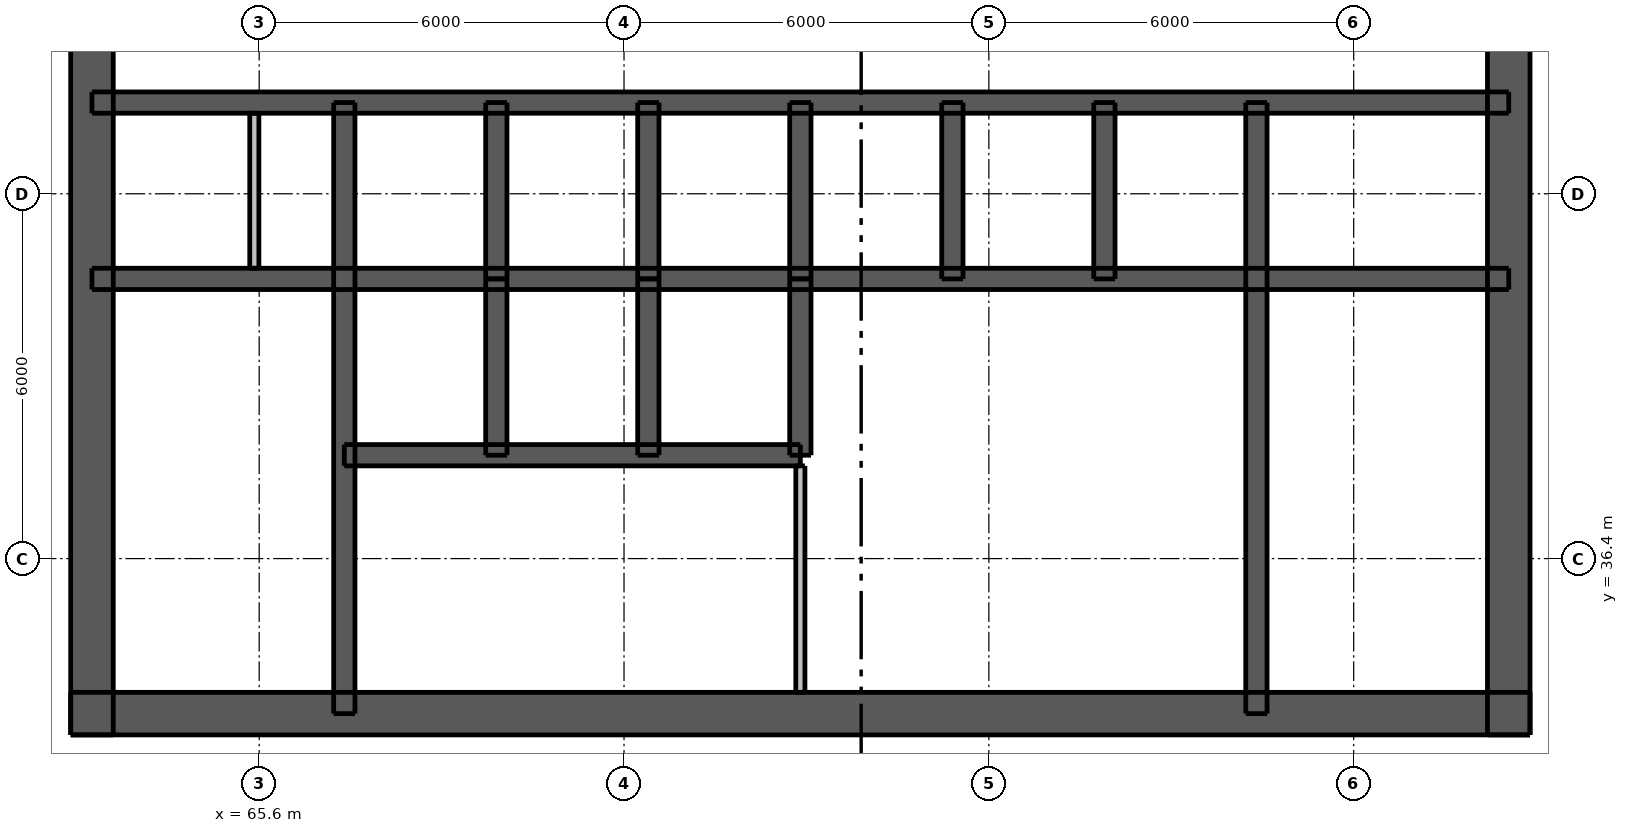
"""IFC4 building model, lengths in metres.
Left out: names, types, materials, properties, quantities, classifications, styles, units other than length and angle.
Written with IfcOpenShell. Run it as: python <this file> out.ifc"""

import sys

from ifc_helpers import new_model, si_unit, direction, frame, frame_2d, origin, place, context, subcontext, project, spatial, rectangle, extrude, element, fill, save


model = new_model("IFC4")
c1 = context("Model", 3, precision=1e-05, world=origin(), true_north=direction((0.0, 1.0)))
c2 = subcontext(c1, "Body", "Model", "MODEL_VIEW")
j1 = project(units=[si_unit("LENGTHUNIT", "METRE"), si_unit("PLANEANGLEUNIT", "RADIAN")], contexts=[c1])
p1 = place(None, origin())
s1 = spatial("IfcSite", under=j1, at=p1, CompositionType="ELEMENT")
p2 = place(p1, origin())
s2 = spatial("IfcBuilding", under=s1, at=p2, CompositionType="ELEMENT")
p3 = place(p2, frame((0.0, 0.0, 140.5)))
s3 = spatial("IfcBuildingStorey", under=s2, at=p3, CompositionType="ELEMENT", Elevation=140.5)
p4 = place(p3, frame((62.5, 33.85, 0.0), z_axis=(0.0, 0.0, 1.0), x_axis=(1.0, 0.0, 0.0)))
e1 = element("IfcWall", 1, at=p4, inside=s3, PredefinedType="SHEAR", context=c2, shape_type="SweptSolid", body=[
    extrude(rectangle(XDim=24.0, YDim=0.7, at=frame_2d((12.0, 0.0))), origin(), (0.0, 0.0, 1.0), 3.05),
])
p5 = place(p4, frame((1.962, 0.0, 0.0)))
e2 = element("IfcOpeningElement", 2, at=p5, cuts=e1, PredefinedType="OPENING", context=c2, shape_type="SweptSolid", body=[
    extrude(rectangle(XDim=1.1, YDim=2.1, at=frame_2d((0.55, 1.05))), frame((0.0, 0.36, 0.0), z_axis=(0.0, -1.0, 0.0), x_axis=(1.0, 0.0, 0.0)), (0.0, 0.0, 1.0), 0.72),
])
p6 = place(p4, frame((20.938, 0.0, 0.0)))
e3 = element("IfcOpeningElement", 3, at=p6, cuts=e1, PredefinedType="OPENING", context=c2, shape_type="SweptSolid", body=[
    extrude(rectangle(XDim=1.1, YDim=2.1, at=frame_2d((0.55, 1.05))), frame((0.0, 0.36, 0.0), z_axis=(0.0, -1.0, 0.0), x_axis=(1.0, 0.0, 0.0)), (0.0, 0.0, 1.0), 0.72),
])
p7 = place(p4, frame((8.0, 0.0, 0.0)))
e4 = element("IfcOpeningElement", 4, at=p7, cuts=e1, PredefinedType="OPENING", context=c2, shape_type="SweptSolid", body=[
    extrude(rectangle(XDim=1.1, YDim=2.1, at=frame_2d((0.55, 1.05))), frame((0.0, 0.36, 0.0), z_axis=(0.0, -1.0, 0.0), x_axis=(1.0, 0.0, 0.0)), (0.0, 0.0, 1.0), 0.72),
])
p8 = place(p4, frame((15.3, 0.0, 0.0)))
e5 = element("IfcOpeningElement", 5, at=p8, cuts=e1, PredefinedType="OPENING", context=c2, shape_type="SweptSolid", body=[
    extrude(rectangle(XDim=0.9, YDim=2.1, at=frame_2d((0.45, 1.05))), frame((0.0, 0.36, 0.0), z_axis=(0.0, -1.0, 0.0), x_axis=(1.0, 0.0, 0.0)), (0.0, 0.0, 1.0), 0.72),
])
p9 = place(p3, frame((62.85, 33.5, 0.0), z_axis=(0.0, 0.0, 1.0), x_axis=(0.0, 1.0, 0.0)))
e6 = element("IfcWall", 6, at=p9, inside=s3, PredefinedType="SHEAR", context=c2, shape_type="SweptSolid", body=[
    extrude(rectangle(XDim=24.0, YDim=0.7, at=frame_2d((12.0, 0.0))), origin(), (0.0, 0.0, 1.0), 3.05),
])
p10 = place(p9, frame((11.2, 0.0, 0.0)))
e7 = element("IfcOpeningElement", 7, at=p10, cuts=e6, PredefinedType="OPENING", context=c2, shape_type="SweptSolid", body=[
    extrude(rectangle(XDim=1.6, YDim=2.1, at=frame_2d((0.8, 1.05))), frame((0.0, 0.36, 0.0), z_axis=(0.0, -1.0, 0.0), x_axis=(1.0, 0.0, 0.0)), (0.0, 0.0, 1.0), 0.72),
])
p11 = place(p3, frame((86.15, 33.5, 0.0), z_axis=(0.0, 0.0, 1.0), x_axis=(0.0, 1.0, 0.0)))
e8 = element("IfcWall", 8, at=p11, inside=s3, PredefinedType="SHEAR", context=c2, shape_type="SweptSolid", body=[
    extrude(rectangle(XDim=24.0, YDim=0.7, at=frame_2d((12.0, 0.0))), origin(), (0.0, 0.0, 1.0), 3.05),
])
p12 = place(p11, frame((11.2, 0.0, 0.0)))
e9 = element("IfcOpeningElement", 9, at=p12, cuts=e8, PredefinedType="OPENING", context=c2, shape_type="SweptSolid", body=[
    extrude(rectangle(XDim=1.6, YDim=2.1, at=frame_2d((0.8, 1.05))), frame((0.0, 0.36, 0.0), z_axis=(0.0, -1.0, 0.0), x_axis=(1.0, 0.0, 0.0)), (0.0, 0.0, 1.0), 0.72),
])
p13 = place(p3, frame((62.85, 41.0, 0.0), z_axis=(0.0, 0.0, 1.0), x_axis=(1.0, 0.0, 0.0)))
e10 = element("IfcWall", 10, at=p13, inside=s3, PredefinedType="SHEAR", context=c2, shape_type="SweptSolid", body=[
    extrude(rectangle(XDim=23.3, YDim=0.35, at=frame_2d((11.65, 0.0))), origin(), (0.0, 0.0, 1.0), 3.05),
])
p14 = place(p3, frame((62.85, 43.9, 0.0), z_axis=(0.0, 0.0, 1.0), x_axis=(1.0, 0.0, 0.0)))
e11 = element("IfcWall", 11, at=p14, inside=s3, PredefinedType="SHEAR", context=c2, shape_type="SweptSolid", body=[
    extrude(rectangle(XDim=23.3, YDim=0.35, at=frame_2d((11.65, 0.0))), origin(), (0.0, 0.0, 1.0), 3.05),
])
p15 = place(p14, frame((1.06, 0.0, 0.0)))
e12 = element("IfcOpeningElement", 12, at=p15, cuts=e11, PredefinedType="OPENING", context=c2, shape_type="SweptSolid", body=[
    extrude(rectangle(XDim=0.9, YDim=2.1, at=frame_2d((0.45, 1.05))), frame((0.0, 0.185, 0.0), z_axis=(0.0, -1.0, 0.0), x_axis=(1.0, 0.0, 0.0)), (0.0, 0.0, 1.0), 0.37),
])
p16 = place(p14, frame((2.923, 0.0, 0.0)))
e13 = element("IfcOpeningElement", 13, at=p16, cuts=e11, PredefinedType="OPENING", context=c2, shape_type="SweptSolid", body=[
    extrude(rectangle(XDim=0.8, YDim=2.1, at=frame_2d((0.4, 1.05))), frame((0.0, 0.185, 0.0), z_axis=(0.0, -1.0, 0.0), x_axis=(1.0, 0.0, 0.0)), (0.0, 0.0, 1.0), 0.37),
])
p17 = place(p14, frame((20.688, 0.0, 0.0)))
e14 = element("IfcOpeningElement", 14, at=p17, cuts=e11, PredefinedType="OPENING", context=c2, shape_type="SweptSolid", body=[
    extrude(rectangle(XDim=0.9, YDim=2.1, at=frame_2d((0.45, 1.05))), frame((0.0, 0.185, 0.0), z_axis=(0.0, -1.0, 0.0), x_axis=(1.0, 0.0, 0.0)), (0.0, 0.0, 1.0), 0.37),
])
p18 = place(p14, frame((4.85, 0.0, 0.0)))
e15 = element("IfcOpeningElement", 15, at=p18, cuts=e11, PredefinedType="OPENING", context=c2, shape_type="SweptSolid", body=[
    extrude(rectangle(XDim=1.1, YDim=2.1, at=frame_2d((0.55, 1.05))), frame((0.0, 0.185, 0.0), z_axis=(0.0, -1.0, 0.0), x_axis=(1.0, 0.0, 0.0)), (0.0, 0.0, 1.0), 0.37),
])
p19 = place(p14, frame((7.35, 0.0, 0.0)))
e16 = element("IfcOpeningElement", 16, at=p19, cuts=e11, PredefinedType="OPENING", context=c2, shape_type="SweptSolid", body=[
    extrude(rectangle(XDim=1.1, YDim=2.1, at=frame_2d((0.55, 1.05))), frame((0.0, 0.185, 0.0), z_axis=(0.0, -1.0, 0.0), x_axis=(1.0, 0.0, 0.0)), (0.0, 0.0, 1.0), 0.37),
])
p20 = place(p14, frame((9.85, 0.0, 0.0)))
e17 = element("IfcOpeningElement", 17, at=p20, cuts=e11, PredefinedType="OPENING", context=c2, shape_type="SweptSolid", body=[
    extrude(rectangle(XDim=1.1, YDim=2.1, at=frame_2d((0.55, 1.05))), frame((0.0, 0.185, 0.0), z_axis=(0.0, -1.0, 0.0), x_axis=(1.0, 0.0, 0.0)), (0.0, 0.0, 1.0), 0.37),
])
p21 = place(p14, frame((12.35, 0.0, 0.0)))
e18 = element("IfcOpeningElement", 18, at=p21, cuts=e11, PredefinedType="OPENING", context=c2, shape_type="SweptSolid", body=[
    extrude(rectangle(XDim=1.1, YDim=2.1, at=frame_2d((0.55, 1.05))), frame((0.0, 0.185, 0.0), z_axis=(0.0, -1.0, 0.0), x_axis=(1.0, 0.0, 0.0)), (0.0, 0.0, 1.0), 0.37),
])
p22 = place(p14, frame((14.85, 0.0, 0.0)))
e19 = element("IfcOpeningElement", 19, at=p22, cuts=e11, PredefinedType="OPENING", context=c2, shape_type="SweptSolid", body=[
    extrude(rectangle(XDim=1.1, YDim=2.1, at=frame_2d((0.55, 1.05))), frame((0.0, 0.185, 0.0), z_axis=(0.0, -1.0, 0.0), x_axis=(1.0, 0.0, 0.0)), (0.0, 0.0, 1.0), 0.37),
])
p23 = place(p14, frame((17.35, 0.0, 0.0)))
e20 = element("IfcOpeningElement", 20, at=p23, cuts=e11, PredefinedType="OPENING", context=c2, shape_type="SweptSolid", body=[
    extrude(rectangle(XDim=1.1, YDim=2.1, at=frame_2d((0.55, 1.05))), frame((0.0, 0.185, 0.0), z_axis=(0.0, -1.0, 0.0), x_axis=(1.0, 0.0, 0.0)), (0.0, 0.0, 1.0), 0.37),
])
p24 = place(p3, frame((67.0, 33.85, 0.0), z_axis=(0.0, 0.0, 1.0), x_axis=(0.0, 1.0, 0.0)))
e21 = element("IfcWall", 21, at=p24, inside=s3, PredefinedType="SHEAR", context=c2, shape_type="SweptSolid", body=[
    extrude(rectangle(XDim=10.05, YDim=0.35, at=frame_2d((5.025, 0.0))), origin(), (0.0, 0.0, 1.0), 3.05),
])
p25 = place(p24, frame((0.55, 0.0, 0.0)))
e22 = element("IfcOpeningElement", 22, at=p25, cuts=e21, PredefinedType="OPENING", context=c2, shape_type="SweptSolid", body=[
    extrude(rectangle(XDim=1.1, YDim=2.1, at=frame_2d((0.55, 1.05))), frame((0.0, 0.185, 0.0), z_axis=(0.0, -1.0, 0.0), x_axis=(1.0, 0.0, 0.0)), (0.0, 0.0, 1.0), 0.37),
])
p26 = place(p3, frame((82.0, 33.85, 0.0), z_axis=(0.0, 0.0, 1.0), x_axis=(0.0, 1.0, 0.0)))
e23 = element("IfcWall", 23, at=p26, inside=s3, PredefinedType="SHEAR", context=c2, shape_type="SweptSolid", body=[
    extrude(rectangle(XDim=10.05, YDim=0.35, at=frame_2d((5.025, 0.0))), origin(), (0.0, 0.0, 1.0), 3.05),
])
for number, where, z_axis, x_axis in (
    (24, (69.5, 41.0, 0.0), (0.0, 0.0, 1.0), (0.0, 1.0, 0.0)),
    (25, (72.0, 41.0, 0.0), (0.0, 0.0, 1.0), (0.0, 1.0, 0.0)),
    (26, (74.5, 41.0, 0.0), (0.0, 0.0, 1.0), (0.0, 1.0, 0.0)),
    (27, (77.0, 41.0, 0.0), (0.0, 0.0, 1.0), (0.0, 1.0, 0.0)),
    (28, (79.5, 41.0, 0.0), (0.0, 0.0, 1.0), (0.0, 1.0, 0.0)),
):
    element("IfcWall", number, at=place(p3, frame(where, z_axis=z_axis, x_axis=x_axis)), inside=s3, PredefinedType="SHEAR", context=c2, shape_type="SweptSolid", body=[
        extrude(rectangle(XDim=2.9, YDim=0.35, at=frame_2d((1.45, 0.0))), origin(), (0.0, 0.0, 1.0), 3.05),
    ])
p27 = place(p3, frame((67.0, 38.1, 0.0), z_axis=(0.0, 0.0, 1.0), x_axis=(1.0, 0.0, 0.0)))
e29 = element("IfcWall", 29, at=p27, inside=s3, PredefinedType="SHEAR", context=c2, shape_type="SweptSolid", body=[
    extrude(rectangle(XDim=7.5, YDim=0.35, at=frame_2d((3.75, 0.0))), origin(), (0.0, 0.0, 1.0), 3.05),
])
p28 = place(p27, frame((0.7, 0.0, 0.0)))
e30 = element("IfcOpeningElement", 30, at=p28, cuts=e29, PredefinedType="OPENING", context=c2, shape_type="SweptSolid", body=[
    extrude(rectangle(XDim=1.1, YDim=2.1, at=frame_2d((0.55, 1.05))), frame((0.0, 0.185, 0.0), z_axis=(0.0, -1.0, 0.0), x_axis=(1.0, 0.0, 0.0)), (0.0, 0.0, 1.0), 0.37),
])
p29 = place(p27, frame((3.2, 0.0, 0.0)))
e31 = element("IfcOpeningElement", 31, at=p29, cuts=e29, PredefinedType="OPENING", context=c2, shape_type="SweptSolid", body=[
    extrude(rectangle(XDim=1.1, YDim=2.1, at=frame_2d((0.55, 1.05))), frame((0.0, 0.185, 0.0), z_axis=(0.0, -1.0, 0.0), x_axis=(1.0, 0.0, 0.0)), (0.0, 0.0, 1.0), 0.37),
])
p30 = place(p27, frame((5.65, 0.0, 0.0)))
e32 = element("IfcOpeningElement", 32, at=p30, cuts=e29, PredefinedType="OPENING", context=c2, shape_type="SweptSolid", body=[
    extrude(rectangle(XDim=1.2, YDim=2.1, at=frame_2d((0.6, 1.05))), frame((0.0, 0.185, 0.0), z_axis=(0.0, -1.0, 0.0), x_axis=(1.0, 0.0, 0.0)), (0.0, 0.0, 1.0), 0.37),
])
for number, where, z_axis, x_axis in (
    (33, (69.5, 38.1, 0.0), (0.0, 0.0, 1.0), (0.0, 1.0, 0.0)),
    (34, (72.0, 38.1, 0.0), (0.0, 0.0, 1.0), (0.0, 1.0, 0.0)),
    (35, (74.5, 38.1, 0.0), (0.0, 0.0, 1.0), (0.0, 1.0, 0.0)),
):
    element("IfcWall", number, at=place(p3, frame(where, z_axis=z_axis, x_axis=x_axis)), inside=s3, PredefinedType="SHEAR", context=c2, shape_type="SweptSolid", body=[
        extrude(rectangle(XDim=2.9, YDim=0.35, at=frame_2d((1.45, 0.0))), origin(), (0.0, 0.0, 1.0), 3.05),
    ])
p31 = place(p3, frame((74.5, 34.2, 0.0), z_axis=(0.0, 0.0, 1.0), x_axis=(0.0, 1.0, 0.0)))
e36 = element("IfcWall", 36, at=p31, inside=s3, PredefinedType="PLUMBINGWALL", context=c2, shape_type="SweptSolid", body=[
    extrude(rectangle(XDim=3.725, YDim=0.15, at=frame_2d((1.863, 0.0))), origin(), (0.0, 0.0, 1.0), 3.05),
])
p32 = place(p3, frame((65.52, 41.175, 0.0), z_axis=(0.0, 0.0, 1.0), x_axis=(0.0, 1.0, 0.0)))
e37 = element("IfcWall", 37, at=p32, inside=s3, PredefinedType="PLUMBINGWALL", context=c2, shape_type="SweptSolid", body=[
    extrude(rectangle(XDim=2.55, YDim=0.15, at=frame_2d((1.275, 0.0))), origin(), (0.0, 0.0, 1.0), 3.05),
])
p33 = place(p5, origin())
e38 = element("IfcDoor", 38, at=p33, inside=s3, OperationType="SINGLE_SWING_LEFT", PredefinedType="DOOR", context=c2, shape_type="SweptSolid", body=[
    extrude(rectangle(XDim=1.1, YDim=2.1, at=frame_2d((0.55, 1.05))), frame((0.0, 0.337, 0.0), z_axis=(0.0, -1.0, 0.0), x_axis=(1.0, 0.0, 0.0)), (0.0, 0.0, 1.0), 0.05),
])
fill(e2, e38)
p34 = place(p6, origin())
e39 = element("IfcDoor", 39, at=p34, inside=s3, OperationType="SINGLE_SWING_RIGHT", PredefinedType="DOOR", context=c2, shape_type="SweptSolid", body=[
    extrude(rectangle(XDim=1.1, YDim=2.1, at=frame_2d((0.55, 1.05))), frame((0.0, 0.337, 0.0), z_axis=(0.0, -1.0, 0.0), x_axis=(1.0, 0.0, 0.0)), (0.0, 0.0, 1.0), 0.05),
])
fill(e3, e39)
p35 = place(p10, origin())
e40 = element("IfcDoor", 40, at=p35, inside=s3, OperationType="DOUBLE_DOOR_SINGLE_SWING", PredefinedType="DOOR", context=c2, shape_type="SweptSolid", body=[
    extrude(rectangle(XDim=1.6, YDim=2.1, at=frame_2d((0.8, 1.05))), frame((0.0, -0.288, 0.0), z_axis=(0.0, -1.0, 0.0), x_axis=(1.0, 0.0, 0.0)), (0.0, 0.0, 1.0), 0.05),
])
fill(e7, e40)
p36 = place(p12, origin())
e41 = element("IfcDoor", 41, at=p36, inside=s3, OperationType="DOUBLE_DOOR_SINGLE_SWING", PredefinedType="DOOR", context=c2, shape_type="SweptSolid", body=[
    extrude(rectangle(XDim=1.6, YDim=2.1, at=frame_2d((0.8, 1.05))), frame((0.0, 0.337, 0.0), z_axis=(0.0, -1.0, 0.0), x_axis=(1.0, 0.0, 0.0)), (0.0, 0.0, 1.0), 0.05),
])
fill(e9, e41)
p37 = place(p7, origin())
e42 = element("IfcDoor", 42, at=p37, inside=s3, OperationType="SINGLE_SWING_LEFT", PredefinedType="DOOR", context=c2, shape_type="SweptSolid", body=[
    extrude(rectangle(XDim=1.1, YDim=2.1, at=frame_2d((0.55, 1.05))), frame((0.0, 0.337, 0.0), z_axis=(0.0, -1.0, 0.0), x_axis=(1.0, 0.0, 0.0)), (0.0, 0.0, 1.0), 0.05),
])
fill(e4, e42)
p38 = place(p25, origin())
e43 = element("IfcDoor", 43, at=p38, inside=s3, OperationType="SINGLE_SWING_RIGHT", PredefinedType="DOOR", context=c2, shape_type="SweptSolid", body=[
    extrude(rectangle(XDim=1.1, YDim=2.1, at=frame_2d((0.55, 1.05))), frame((0.0, -0.112, 0.0), z_axis=(0.0, -1.0, 0.0), x_axis=(1.0, 0.0, 0.0)), (0.0, 0.0, 1.0), 0.05),
])
fill(e22, e43)
p39 = place(p8, origin())
e44 = element("IfcDoor", 44, at=p39, inside=s3, OperationType="SINGLE_SWING_LEFT", PredefinedType="DOOR", context=c2, shape_type="SweptSolid", body=[
    extrude(rectangle(XDim=0.9, YDim=2.1, at=frame_2d((0.45, 1.05))), frame((0.0, 0.337, 0.0), z_axis=(0.0, -1.0, 0.0), x_axis=(1.0, 0.0, 0.0)), (0.0, 0.0, 1.0), 0.05),
])
fill(e5, e44)
p40 = place(p15, origin())
e45 = element("IfcDoor", 45, at=p40, inside=s3, OperationType="SINGLE_SWING_LEFT", PredefinedType="DOOR", context=c2, shape_type="SweptSolid", body=[
    extrude(rectangle(XDim=0.9, YDim=2.1, at=frame_2d((0.45, 1.05))), frame((0.0, -0.112, 0.0), z_axis=(0.0, -1.0, 0.0), x_axis=(1.0, 0.0, 0.0)), (0.0, 0.0, 1.0), 0.05),
])
fill(e12, e45)
p41 = place(p16, origin())
e46 = element("IfcDoor", 46, at=p41, inside=s3, OperationType="SINGLE_SWING_RIGHT", PredefinedType="DOOR", context=c2, shape_type="SweptSolid", body=[
    extrude(rectangle(XDim=0.8, YDim=2.1, at=frame_2d((0.4, 1.05))), frame((0.0, -0.112, 0.0), z_axis=(0.0, -1.0, 0.0), x_axis=(1.0, 0.0, 0.0)), (0.0, 0.0, 1.0), 0.05),
])
fill(e13, e46)
p42 = place(p17, origin())
e47 = element("IfcDoor", 47, at=p42, inside=s3, OperationType="SINGLE_SWING_LEFT", PredefinedType="DOOR", context=c2, shape_type="SweptSolid", body=[
    extrude(rectangle(XDim=0.9, YDim=2.1, at=frame_2d((0.45, 1.05))), frame((0.0, -0.112, 0.0), z_axis=(0.0, -1.0, 0.0), x_axis=(1.0, 0.0, 0.0)), (0.0, 0.0, 1.0), 0.05),
])
fill(e14, e47)
p43 = place(p18, origin())
e48 = element("IfcDoor", 48, at=p43, inside=s3, OperationType="DOUBLE_DOOR_SLIDING", PredefinedType="DOOR", context=c2, shape_type="SweptSolid", body=[
    extrude(rectangle(XDim=1.1, YDim=2.1, at=frame_2d((0.55, 1.05))), frame((0.0, 0.025, 0.0), z_axis=(0.0, -1.0, 0.0), x_axis=(1.0, 0.0, 0.0)), (0.0, 0.0, 1.0), 0.05),
])
fill(e15, e48)
p44 = place(p19, origin())
e49 = element("IfcDoor", 49, at=p44, inside=s3, OperationType="DOUBLE_DOOR_SLIDING", PredefinedType="DOOR", context=c2, shape_type="SweptSolid", body=[
    extrude(rectangle(XDim=1.1, YDim=2.1, at=frame_2d((0.55, 1.05))), frame((0.0, 0.025, 0.0), z_axis=(0.0, -1.0, 0.0), x_axis=(1.0, 0.0, 0.0)), (0.0, 0.0, 1.0), 0.05),
])
fill(e16, e49)
p45 = place(p20, origin())
e50 = element("IfcDoor", 50, at=p45, inside=s3, OperationType="DOUBLE_DOOR_SLIDING", PredefinedType="DOOR", context=c2, shape_type="SweptSolid", body=[
    extrude(rectangle(XDim=1.1, YDim=2.1, at=frame_2d((0.55, 1.05))), frame((0.0, 0.025, 0.0), z_axis=(0.0, -1.0, 0.0), x_axis=(1.0, 0.0, 0.0)), (0.0, 0.0, 1.0), 0.05),
])
fill(e17, e50)
p46 = place(p21, origin())
e51 = element("IfcDoor", 51, at=p46, inside=s3, OperationType="DOUBLE_DOOR_SLIDING", PredefinedType="DOOR", context=c2, shape_type="SweptSolid", body=[
    extrude(rectangle(XDim=1.1, YDim=2.1, at=frame_2d((0.55, 1.05))), frame((0.0, 0.025, 0.0), z_axis=(0.0, -1.0, 0.0), x_axis=(1.0, 0.0, 0.0)), (0.0, 0.0, 1.0), 0.05),
])
fill(e18, e51)
p47 = place(p22, origin())
e52 = element("IfcDoor", 52, at=p47, inside=s3, OperationType="DOUBLE_DOOR_SLIDING", PredefinedType="DOOR", context=c2, shape_type="SweptSolid", body=[
    extrude(rectangle(XDim=1.1, YDim=2.1, at=frame_2d((0.55, 1.05))), frame((0.0, 0.025, 0.0), z_axis=(0.0, -1.0, 0.0), x_axis=(1.0, 0.0, 0.0)), (0.0, 0.0, 1.0), 0.05),
])
fill(e19, e52)
p48 = place(p23, origin())
e53 = element("IfcDoor", 53, at=p48, inside=s3, OperationType="DOUBLE_DOOR_SLIDING", PredefinedType="DOOR", context=c2, shape_type="SweptSolid", body=[
    extrude(rectangle(XDim=1.1, YDim=2.1, at=frame_2d((0.55, 1.05))), frame((0.0, 0.025, 0.0), z_axis=(0.0, -1.0, 0.0), x_axis=(1.0, 0.0, 0.0)), (0.0, 0.0, 1.0), 0.05),
])
fill(e20, e53)
p49 = place(p28, origin())
e54 = element("IfcDoor", 54, at=p49, inside=s3, OperationType="DOUBLE_DOOR_SLIDING", PredefinedType="DOOR", context=c2, shape_type="SweptSolid", body=[
    extrude(rectangle(XDim=1.1, YDim=2.1, at=frame_2d((0.55, 1.05))), frame((0.0, 0.025, 0.0), z_axis=(0.0, -1.0, 0.0), x_axis=(1.0, 0.0, 0.0)), (0.0, 0.0, 1.0), 0.05),
])
fill(e30, e54)
p50 = place(p29, origin())
e55 = element("IfcDoor", 55, at=p50, inside=s3, OperationType="DOUBLE_DOOR_SLIDING", PredefinedType="DOOR", context=c2, shape_type="SweptSolid", body=[
    extrude(rectangle(XDim=1.1, YDim=2.1, at=frame_2d((0.55, 1.05))), frame((0.0, 0.025, 0.0), z_axis=(0.0, -1.0, 0.0), x_axis=(1.0, 0.0, 0.0)), (0.0, 0.0, 1.0), 0.05),
])
fill(e31, e55)
p51 = place(p30, origin())
e56 = element("IfcDoor", 56, at=p51, inside=s3, OperationType="DOUBLE_DOOR_SLIDING", PredefinedType="DOOR", context=c2, shape_type="SweptSolid", body=[
    extrude(rectangle(XDim=1.2, YDim=2.1, at=frame_2d((0.6, 1.05))), frame((0.0, 0.025, 0.0), z_axis=(0.0, -1.0, 0.0), x_axis=(1.0, 0.0, 0.0)), (0.0, 0.0, 1.0), 0.05),
])
fill(e32, e56)
save(model, sys.argv[1])
